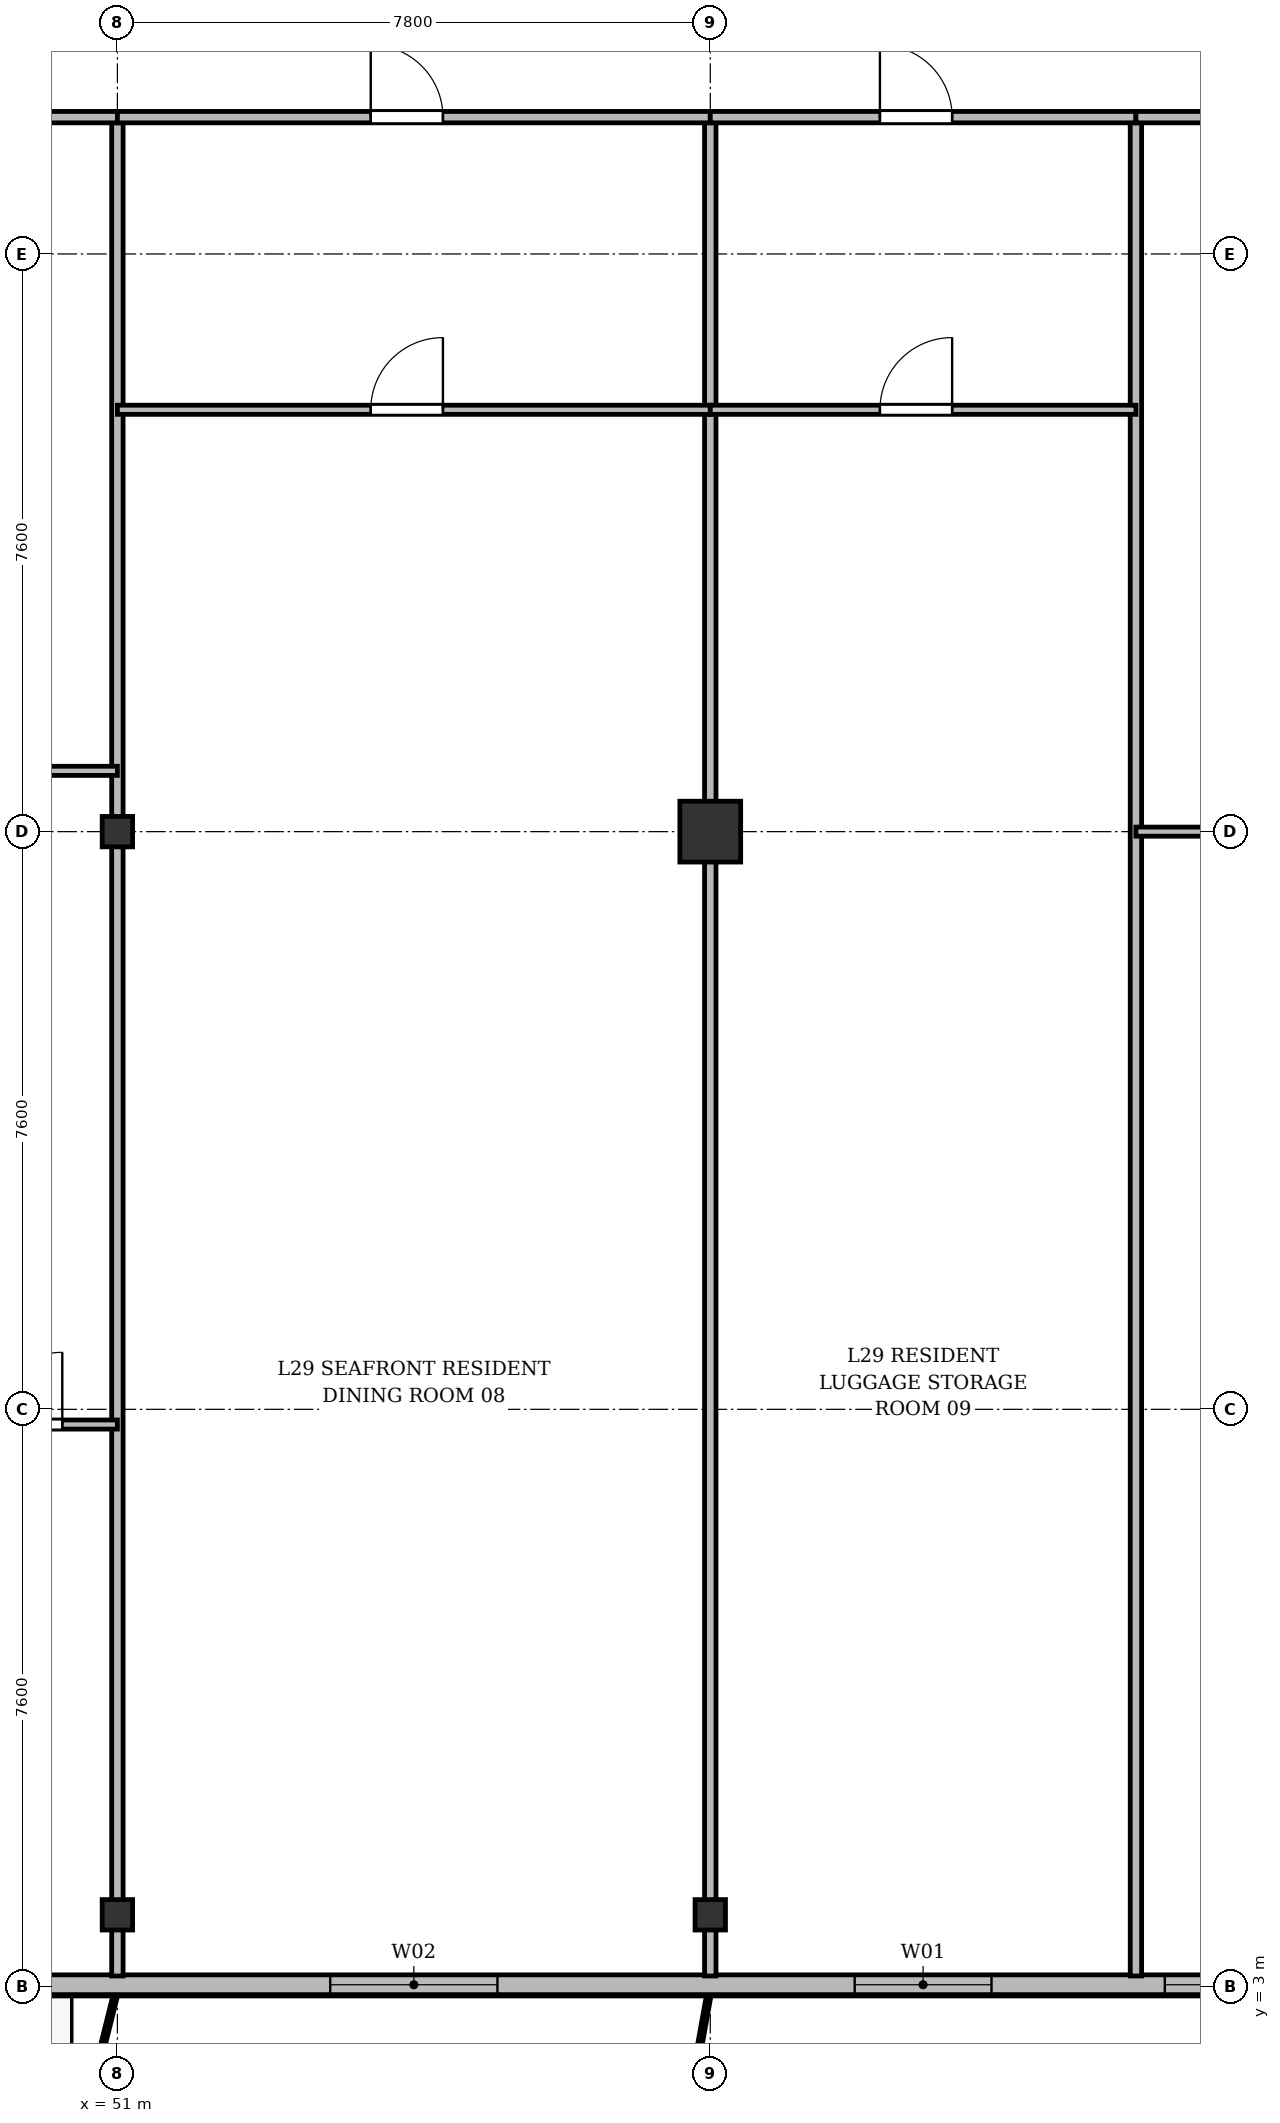
"""IFC4 building model, lengths in metres.
Left out: names, types, materials, properties, quantities, classifications, styles, units other than length and angle.
Written with IfcOpenShell. Run it as: python <this file> out.ifc"""

import sys

from ifc_helpers import new_model, si_unit, direction, frame, frame_2d, origin, origin_2d, place, context, subcontext, project, spatial, rectangle, i_section, extrude, source, transform, mapped, element, fill, save


model = new_model("IFC4")
c1 = context("Model", 3, precision=1e-05, world=origin(), true_north=direction((0.0, 1.0)))
c2 = subcontext(c1, "Body", "Model", "MODEL_VIEW")
j1 = project(units=[si_unit("LENGTHUNIT", "METRE"), si_unit("PLANEANGLEUNIT", "RADIAN")], contexts=[c1])
p1 = place(None, origin())
s1 = spatial("IfcSite", under=j1, at=p1, CompositionType="ELEMENT")
p2 = place(p1, origin())
s2 = spatial("IfcBuilding", under=s1, at=p2, CompositionType="ELEMENT")
p3 = place(p2, frame((0.0, 0.0, 114.1)))
s3 = spatial("IfcBuildingStorey", under=s2, at=p3, CompositionType="ELEMENT", Elevation=114.1)
m1 = source(origin(), c2, "Body", "SweptSolid", [
    extrude(i_section(OverallWidth=0.4, OverallDepth=0.4, WebThickness=0.022, FlangeThickness=0.035, at=origin_2d()), origin(), (0.0, 0.0, 1.0), 3.6),
])
for number, where, z_axis, x_axis in (
    (1, (51.0, 3.95, 0.0), (0.0, 0.0, 1.0), (1.0, 0.0, 0.0)),
    (2, (51.0, 18.2, 0.0), (0.0, 0.0, 1.0), (1.0, 0.0, 0.0)),
    (3, (58.8, 3.95, 0.0), (0.0, 0.0, 1.0), (1.0, 0.0, 0.0)),
):
    element("IfcColumn", number, at=place(p3, frame(where, z_axis=z_axis, x_axis=x_axis)), inside=s3, PredefinedType="COLUMN", context=c2, shape_type="MappedRepresentation", body=[
        mapped(m1, transform((0.0, 0.0, 0.0), x_axis=(1.0, 0.0, 0.0), y_axis=(0.0, 1.0, 0.0), z_axis=(0.0, 0.0, 1.0), scale=1.0)),
    ])
m2 = source(origin(), c2, "Body", "SweptSolid", [
    extrude(rectangle(XDim=0.8, YDim=0.8, at=origin_2d()), origin(), (0.0, 0.0, 1.0), 3.6),
])
p4 = place(p3, frame((58.8, 18.2, 0.0), z_axis=(0.0, 0.0, 1.0), x_axis=(1.0, 0.0, 0.0)))
e4 = element("IfcColumn", 4, at=p4, inside=s3, PredefinedType="COLUMN", context=c2, shape_type="MappedRepresentation", body=[
    mapped(m2, transform((0.0, 0.0, 0.0), x_axis=(1.0, 0.0, 0.0), y_axis=(0.0, 1.0, 0.0), z_axis=(0.0, 0.0, 1.0), scale=1.0)),
])
p5 = place(p3, frame((66.9, 3.03, 0.0), z_axis=(0.0, 0.0, 1.0), x_axis=(-1.0, 0.0, 0.0)))
e5 = element("IfcWall", 5, at=p5, inside=s3, PredefinedType="SOLIDWALL", context=c2, shape_type="SweptSolid", body=[
    extrude(rectangle(XDim=59.4, YDim=0.26, at=frame_2d((29.7, 0.0))), origin(), (0.0, 0.0, 1.0), 3.34),
])
p6 = place(p5, frame((0.47, 0.0, 0.9)))
e6 = element("IfcOpeningElement", 6, at=p6, cuts=e5, PredefinedType="OPENING", context=c2, shape_type="SweptSolid", body=[
    extrude(rectangle(XDim=1.65, YDim=1.85, at=frame_2d((0.825, 0.925))), frame((0.0, 0.14, 0.0), z_axis=(0.0, -1.0, 0.0), x_axis=(1.0, 0.0, 0.0)), (0.0, 0.0, 1.0), 0.28),
])
p7 = place(p5, frame((4.4, 0.0, 0.9)))
e7 = element("IfcOpeningElement", 7, at=p7, cuts=e5, PredefinedType="OPENING", context=c2, shape_type="SweptSolid", body=[
    extrude(rectangle(XDim=1.8, YDim=1.8, at=frame_2d((0.9, 0.9))), frame((0.0, 0.14, 0.0), z_axis=(0.0, -1.0, 0.0), x_axis=(1.0, 0.0, 0.0)), (0.0, 0.0, 1.0), 0.28),
])
p8 = place(p5, frame((10.9, 0.0, 0.9)))
e8 = element("IfcOpeningElement", 8, at=p8, cuts=e5, PredefinedType="OPENING", context=c2, shape_type="SweptSolid", body=[
    extrude(rectangle(XDim=2.2, YDim=1.8, at=frame_2d((1.1, 0.9))), frame((0.0, 0.14, 0.0), z_axis=(0.0, -1.0, 0.0), x_axis=(1.0, 0.0, 0.0)), (0.0, 0.0, 1.0), 0.28),
])
p9 = place(p5, frame((16.92, 0.0, 0.0)))
e9 = element("IfcOpeningElement", 9, at=p9, cuts=e5, PredefinedType="OPENING", context=c2, shape_type="SweptSolid", body=[
    extrude(rectangle(XDim=1.2, YDim=2.2, at=frame_2d((0.6, 1.1))), frame((0.0, 0.14, 0.0), z_axis=(0.0, -1.0, 0.0), x_axis=(1.0, 0.0, 0.0)), (0.0, 0.0, 1.0), 0.28),
])
p10 = place(p5, frame((18.75, 0.0, 0.9)))
e10 = element("IfcOpeningElement", 10, at=p10, cuts=e5, PredefinedType="OPENING", context=c2, shape_type="SweptSolid", body=[
    extrude(rectangle(XDim=1.5, YDim=1.75, at=frame_2d((0.75, 0.875))), frame((0.0, 0.14, 0.0), z_axis=(0.0, -1.0, 0.0), x_axis=(1.0, 0.0, 0.0)), (0.0, 0.0, 1.0), 0.28),
])
p11 = place(p5, frame((21.075, 0.0, 0.9)))
e11 = element("IfcOpeningElement", 11, at=p11, cuts=e5, PredefinedType="OPENING", context=c2, shape_type="SweptSolid", body=[
    extrude(rectangle(XDim=1.65, YDim=1.85, at=frame_2d((0.825, 0.925))), frame((0.0, 0.14, 0.0), z_axis=(0.0, -1.0, 0.0), x_axis=(1.0, 0.0, 0.0)), (0.0, 0.0, 1.0), 0.28),
])
p12 = place(p5, frame((26.5, 0.0, 0.9)))
e12 = element("IfcOpeningElement", 12, at=p12, cuts=e5, PredefinedType="OPENING", context=c2, shape_type="SweptSolid", body=[
    extrude(rectangle(XDim=1.8, YDim=1.8, at=frame_2d((0.9, 0.9))), frame((0.0, 0.14, 0.0), z_axis=(0.0, -1.0, 0.0), x_axis=(1.0, 0.0, 0.0)), (0.0, 0.0, 1.0), 0.28),
])
p13 = place(p5, frame((32.45, 0.0, 0.9)))
e13 = element("IfcOpeningElement", 13, at=p13, cuts=e5, PredefinedType="OPENING", context=c2, shape_type="SweptSolid", body=[
    extrude(rectangle(XDim=2.2, YDim=1.8, at=frame_2d((1.1, 0.9))), frame((0.0, 0.14, 0.0), z_axis=(0.0, -1.0, 0.0), x_axis=(1.0, 0.0, 0.0)), (0.0, 0.0, 1.0), 0.28),
])
p14 = place(p5, frame((36.5, 0.0, 0.9)))
e14 = element("IfcOpeningElement", 14, at=p14, cuts=e5, PredefinedType="OPENING", context=c2, shape_type="SweptSolid", body=[
    extrude(rectangle(XDim=1.5, YDim=1.75, at=frame_2d((0.75, 0.875))), frame((0.0, 0.14, 0.0), z_axis=(0.0, -1.0, 0.0), x_axis=(1.0, 0.0, 0.0)), (0.0, 0.0, 1.0), 0.28),
])
p15 = place(p5, frame((39.6, 0.0, 0.9)))
e15 = element("IfcOpeningElement", 15, at=p15, cuts=e5, PredefinedType="OPENING", context=c2, shape_type="SweptSolid", body=[
    extrude(rectangle(XDim=2.0, YDim=1.95, at=frame_2d((1.0, 0.975))), frame((0.0, 0.14, 0.0), z_axis=(0.0, -1.0, 0.0), x_axis=(1.0, 0.0, 0.0)), (0.0, 0.0, 1.0), 0.28),
])
p16 = place(p5, frame((42.775, 0.0, 0.9)))
e16 = element("IfcOpeningElement", 16, at=p16, cuts=e5, PredefinedType="OPENING", context=c2, shape_type="SweptSolid", body=[
    extrude(rectangle(XDim=1.65, YDim=1.85, at=frame_2d((0.825, 0.925))), frame((0.0, 0.14, 0.0), z_axis=(0.0, -1.0, 0.0), x_axis=(1.0, 0.0, 0.0)), (0.0, 0.0, 1.0), 0.28),
])
p17 = place(p5, frame((46.435, 0.0, 0.0)))
e17 = element("IfcOpeningElement", 17, at=p17, cuts=e5, PredefinedType="OPENING", context=c2, shape_type="SweptSolid", body=[
    extrude(rectangle(XDim=1.2, YDim=2.2, at=frame_2d((0.6, 1.1))), frame((0.0, 0.14, 0.0), z_axis=(0.0, -1.0, 0.0), x_axis=(1.0, 0.0, 0.0)), (0.0, 0.0, 1.0), 0.28),
])
p18 = place(p5, frame((48.65, 0.0, 0.9)))
e18 = element("IfcOpeningElement", 18, at=p18, cuts=e5, PredefinedType="OPENING", context=c2, shape_type="SweptSolid", body=[
    extrude(rectangle(XDim=2.2, YDim=1.8, at=frame_2d((1.1, 0.9))), frame((0.0, 0.14, 0.0), z_axis=(0.0, -1.0, 0.0), x_axis=(1.0, 0.0, 0.0)), (0.0, 0.0, 1.0), 0.28),
])
p19 = place(p5, frame((53.25, 0.0, 0.9)))
e19 = element("IfcOpeningElement", 19, at=p19, cuts=e5, PredefinedType="OPENING", context=c2, shape_type="SweptSolid", body=[
    extrude(rectangle(XDim=1.5, YDim=1.75, at=frame_2d((0.75, 0.875))), frame((0.0, 0.14, 0.0), z_axis=(0.0, -1.0, 0.0), x_axis=(1.0, 0.0, 0.0)), (0.0, 0.0, 1.0), 0.28),
])
p20 = place(p5, frame((57.005, 0.0, 0.9)))
e20 = element("IfcOpeningElement", 20, at=p20, cuts=e5, PredefinedType="OPENING", context=c2, shape_type="SweptSolid", body=[
    extrude(rectangle(XDim=2.0, YDim=1.95, at=frame_2d((1.0, 0.975))), frame((0.0, 0.14, 0.0), z_axis=(0.0, -1.0, 0.0), x_axis=(1.0, 0.0, 0.0)), (0.0, 0.0, 1.0), 0.28),
])
for number, where, z_axis, x_axis in (
    (21, (51.0, 3.145, 0.0), (0.0, 0.0, 1.0), (0.0, 1.0, 0.0)),
    (22, (58.8, 3.145, 0.0), (0.0, 0.0, 1.0), (0.0, 1.0, 0.0)),
):
    element("IfcWall", number, at=place(p3, frame(where, z_axis=z_axis, x_axis=x_axis)), inside=s3, PredefinedType="PARTITIONING", context=c2, shape_type="SweptSolid", body=[
        extrude(rectangle(XDim=24.455, YDim=0.15, at=frame_2d((12.228, 0.0))), origin(), (0.0, 0.0, 1.0), 2.84),
    ])
p21 = place(p3, frame((64.4, 3.145, 0.0), z_axis=(0.0, 0.0, 1.0), x_axis=(0.0, 1.0, 0.0)))
e23 = element("IfcWall", 23, at=p21, inside=s3, PredefinedType="PARTITIONING", context=c2, shape_type="SweptSolid", body=[
    extrude(rectangle(XDim=24.455, YDim=0.15, at=frame_2d((12.228, 0.0))), origin(), (0.0, 0.0, 1.0), 2.752),
])
p22 = place(p3, frame((43.8, 19.0, 0.0), z_axis=(0.0, 0.0, 1.0), x_axis=(1.0, 0.0, 0.0)))
e24 = element("IfcWall", 24, at=p22, inside=s3, PredefinedType="PARTITIONING", context=c2, shape_type="SweptSolid", body=[
    extrude(rectangle(XDim=7.2, YDim=0.12, at=frame_2d((3.6, 0.0))), origin(), (0.0, 0.0, 1.0), 2.84),
])
p23 = place(p22, frame((3.125, 0.0, 0.0)))
e25 = element("IfcOpeningElement", 25, at=p23, cuts=e24, PredefinedType="OPENING", context=c2, shape_type="SweptSolid", body=[
    extrude(rectangle(XDim=0.95, YDim=2.15, at=frame_2d((0.475, 1.075))), frame((0.0, 0.07, 0.0), z_axis=(0.0, -1.0, 0.0), x_axis=(1.0, 0.0, 0.0)), (0.0, 0.0, 1.0), 0.14),
])
p24 = place(p3, frame((43.8, 27.6, 0.0), z_axis=(0.0, 0.0, 1.0), x_axis=(1.0, 0.0, 0.0)))
e26 = element("IfcWall", 26, at=p24, inside=s3, PredefinedType="PARTITIONING", context=c2, shape_type="SweptSolid", body=[
    extrude(rectangle(XDim=7.2, YDim=0.15, at=frame_2d((3.6, 0.0))), origin(), (0.0, 0.0, 1.0), 2.84),
])
p25 = place(p24, frame((4.706, 0.0, 0.0)))
e27 = element("IfcOpeningElement", 27, at=p25, cuts=e26, PredefinedType="OPENING", context=c2, shape_type="SweptSolid", body=[
    extrude(rectangle(XDim=0.95, YDim=2.15, at=frame_2d((0.475, 1.075))), frame((0.0, 0.085, 0.0), z_axis=(0.0, -1.0, 0.0), x_axis=(1.0, 0.0, 0.0)), (0.0, 0.0, 1.0), 0.17),
])
p26 = place(p3, frame((48.6, 10.4, 0.0), z_axis=(0.0, 0.0, 1.0), x_axis=(1.0, 0.0, 0.0)))
e28 = element("IfcWall", 28, at=p26, inside=s3, PredefinedType="PARTITIONING", context=c2, shape_type="SweptSolid", body=[
    extrude(rectangle(XDim=2.4, YDim=0.12, at=frame_2d((1.2, 0.0))), origin(), (0.0, 0.0, 1.0), 2.84),
])
p27 = place(p26, frame((0.725, 0.0, 0.0)))
e29 = element("IfcOpeningElement", 29, at=p27, cuts=e28, PredefinedType="OPENING", context=c2, shape_type="SweptSolid", body=[
    extrude(rectangle(XDim=0.95, YDim=2.15, at=frame_2d((0.475, 1.075))), frame((0.0, 0.07, 0.0), z_axis=(0.0, -1.0, 0.0), x_axis=(1.0, 0.0, 0.0)), (0.0, 0.0, 1.0), 0.14),
])
p28 = place(p3, frame((51.0, 27.6, 0.0), z_axis=(0.0, 0.0, 1.0), x_axis=(1.0, 0.0, 0.0)))
e30 = element("IfcWall", 30, at=p28, inside=s3, PredefinedType="PARTITIONING", context=c2, shape_type="SweptSolid", body=[
    extrude(rectangle(XDim=7.8, YDim=0.15, at=frame_2d((3.9, 0.0))), origin(), (0.0, 0.0, 1.0), 2.84),
])
p29 = place(p28, frame((3.333, 0.0, 0.0)))
e31 = element("IfcOpeningElement", 31, at=p29, cuts=e30, PredefinedType="OPENING", context=c2, shape_type="SweptSolid", body=[
    extrude(rectangle(XDim=0.95, YDim=2.15, at=frame_2d((0.475, 1.075))), frame((0.0, 0.085, 0.0), z_axis=(0.0, -1.0, 0.0), x_axis=(1.0, 0.0, 0.0)), (0.0, 0.0, 1.0), 0.17),
])
p30 = place(p3, frame((51.0, 23.75, 0.0), z_axis=(0.0, 0.0, 1.0), x_axis=(1.0, 0.0, 0.0)))
e32 = element("IfcWall", 32, at=p30, inside=s3, PredefinedType="PARTITIONING", context=c2, shape_type="SweptSolid", body=[
    extrude(rectangle(XDim=7.8, YDim=0.12, at=frame_2d((3.9, 0.0))), origin(), (0.0, 0.0, 1.0), 2.84),
])
p31 = place(p30, frame((3.333, 0.0, 0.0)))
e33 = element("IfcOpeningElement", 33, at=p31, cuts=e32, PredefinedType="OPENING", context=c2, shape_type="SweptSolid", body=[
    extrude(rectangle(XDim=0.95, YDim=2.15, at=frame_2d((0.475, 1.075))), frame((0.0, 0.07, 0.0), z_axis=(0.0, -1.0, 0.0), x_axis=(1.0, 0.0, 0.0)), (0.0, 0.0, 1.0), 0.14),
])
p32 = place(p3, frame((58.8, 27.6, 0.0), z_axis=(0.0, 0.0, 1.0), x_axis=(1.0, 0.0, 0.0)))
e34 = element("IfcWall", 34, at=p32, inside=s3, PredefinedType="PARTITIONING", context=c2, shape_type="SweptSolid", body=[
    extrude(rectangle(XDim=5.6, YDim=0.15, at=frame_2d((2.8, 0.0))), origin(), (0.0, 0.0, 1.0), 2.84),
])
p33 = place(p32, frame((2.232, 0.0, 0.0)))
e35 = element("IfcOpeningElement", 35, at=p33, cuts=e34, PredefinedType="OPENING", context=c2, shape_type="SweptSolid", body=[
    extrude(rectangle(XDim=0.95, YDim=2.15, at=frame_2d((0.475, 1.075))), frame((0.0, 0.085, 0.0), z_axis=(0.0, -1.0, 0.0), x_axis=(1.0, 0.0, 0.0)), (0.0, 0.0, 1.0), 0.17),
])
p34 = place(p3, frame((58.8, 23.75, 0.0), z_axis=(0.0, 0.0, 1.0), x_axis=(1.0, 0.0, 0.0)))
e36 = element("IfcWall", 36, at=p34, inside=s3, PredefinedType="PARTITIONING", context=c2, shape_type="SweptSolid", body=[
    extrude(rectangle(XDim=5.6, YDim=0.12, at=frame_2d((2.8, 0.0))), origin(), (0.0, 0.0, 1.0), 2.84),
])
p35 = place(p34, frame((2.232, 0.0, 0.0)))
e37 = element("IfcOpeningElement", 37, at=p35, cuts=e36, PredefinedType="OPENING", context=c2, shape_type="SweptSolid", body=[
    extrude(rectangle(XDim=0.95, YDim=2.15, at=frame_2d((0.475, 1.075))), frame((0.0, 0.07, 0.0), z_axis=(0.0, -1.0, 0.0), x_axis=(1.0, 0.0, 0.0)), (0.0, 0.0, 1.0), 0.14),
])
p36 = place(p3, frame((64.4, 27.6, 0.0), z_axis=(0.0, 0.0, 1.0), x_axis=(1.0, 0.0, 0.0)))
e38 = element("IfcWall", 38, at=p36, inside=s3, PredefinedType="PARTITIONING", context=c2, shape_type="SweptSolid", body=[
    extrude(rectangle(XDim=5.255, YDim=0.15, at=frame_2d((2.627, 0.0))), origin(), (0.0, 0.0, 1.0), 2.84),
])
p37 = place(p36, frame((2.059, 0.0, 0.0)))
e39 = element("IfcOpeningElement", 39, at=p37, cuts=e38, PredefinedType="OPENING", context=c2, shape_type="SweptSolid", body=[
    extrude(rectangle(XDim=0.95, YDim=2.15, at=frame_2d((0.475, 1.075))), frame((0.0, 0.085, 0.0), z_axis=(0.0, -1.0, 0.0), x_axis=(1.0, 0.0, 0.0)), (0.0, 0.0, 1.0), 0.17),
])
p38 = place(p3, frame((64.4, 18.2, 0.0), z_axis=(0.0, 0.0, 1.0), x_axis=(1.0, 0.0, 0.0)))
e40 = element("IfcWall", 40, at=p38, inside=s3, PredefinedType="PARTITIONING", context=c2, shape_type="SweptSolid", body=[
    extrude(rectangle(XDim=5.255, YDim=0.12, at=frame_2d((2.627, 0.0))), origin(), (0.0, 0.0, 1.0), 2.752),
])
p39 = place(p38, frame((2.246, 0.0, 0.0)))
e41 = element("IfcOpeningElement", 41, at=p39, cuts=e40, PredefinedType="OPENING", context=c2, shape_type="SweptSolid", body=[
    extrude(rectangle(XDim=0.95, YDim=2.15, at=frame_2d((0.475, 1.075))), frame((0.0, 0.07, 0.0), z_axis=(0.0, -1.0, 0.0), x_axis=(1.0, 0.0, 0.0)), (0.0, 0.0, 1.0), 0.14),
])
m3 = source(origin(), c2, "Body", "SweptSolid", [
    extrude(rectangle(XDim=1.65, YDim=1.85, at=frame_2d((0.825, 0.925))), frame((0.0, 0.03, 0.0), z_axis=(0.0, -1.0, 0.0), x_axis=(1.0, 0.0, 0.0)), (0.0, 0.0, 1.0), 0.06),
])
p40 = place(p6, origin())
e42 = element("IfcWindow", 42, at=p40, inside=s3, PartitioningType="SINGLE_PANEL", PredefinedType="WINDOW", context=c2, shape_type="MappedRepresentation", body=[
    mapped(m3, transform((0.0, 0.0, 0.0), x_axis=(1.0, 0.0, 0.0), y_axis=(0.0, 1.0, 0.0), z_axis=(0.0, 0.0, 1.0), scale=1.0)),
])
fill(e6, e42)
m4 = source(origin(), c2, "Body", "SweptSolid", [
    extrude(rectangle(XDim=1.8, YDim=1.8, at=frame_2d((0.9, 0.9))), frame((0.0, 0.03, 0.0), z_axis=(0.0, -1.0, 0.0), x_axis=(1.0, 0.0, 0.0)), (0.0, 0.0, 1.0), 0.06),
])
p41 = place(p7, origin())
e43 = element("IfcWindow", 43, at=p41, inside=s3, PartitioningType="SINGLE_PANEL", PredefinedType="WINDOW", context=c2, shape_type="MappedRepresentation", body=[
    mapped(m4, transform((0.0, 0.0, 0.0), x_axis=(1.0, 0.0, 0.0), y_axis=(0.0, 1.0, 0.0), z_axis=(0.0, 0.0, 1.0), scale=1.0)),
])
fill(e7, e43)
m5 = source(origin(), c2, "Body", "SweptSolid", [
    extrude(rectangle(XDim=2.2, YDim=1.8, at=frame_2d((1.1, 0.9))), frame((0.0, 0.03, 0.0), z_axis=(0.0, -1.0, 0.0), x_axis=(1.0, 0.0, 0.0)), (0.0, 0.0, 1.0), 0.06),
])
p42 = place(p8, origin())
e44 = element("IfcWindow", 44, at=p42, inside=s3, PartitioningType="SINGLE_PANEL", PredefinedType="WINDOW", context=c2, shape_type="MappedRepresentation", body=[
    mapped(m5, transform((0.0, 0.0, 0.0), x_axis=(1.0, 0.0, 0.0), y_axis=(0.0, 1.0, 0.0), z_axis=(0.0, 0.0, 1.0), scale=1.0)),
])
fill(e8, e44)
m6 = source(origin(), c2, "Body", "SweptSolid", [
    extrude(rectangle(XDim=0.95, YDim=2.15, at=frame_2d((0.475, 1.075))), frame((0.0, 0.025, 0.0), z_axis=(0.0, -1.0, 0.0), x_axis=(1.0, 0.0, 0.0)), (0.0, 0.0, 1.0), 0.05),
])
p43 = place(p27, origin())
e45 = element("IfcDoor", 45, at=p43, inside=s3, OperationType="SINGLE_SWING_RIGHT", PredefinedType="DOOR", context=c2, shape_type="MappedRepresentation", body=[
    mapped(m6, transform((0.0, 0.0, 0.0), x_axis=(1.0, 0.0, 0.0), y_axis=(0.0, 1.0, 0.0), z_axis=(0.0, 0.0, 1.0), scale=1.0)),
])
fill(e29, e45)
p44 = place(p29, origin())
e46 = element("IfcDoor", 46, at=p44, inside=s3, OperationType="SINGLE_SWING_LEFT", PredefinedType="DOOR", context=c2, shape_type="MappedRepresentation", body=[
    mapped(m6, transform((0.0, 0.0, 0.0), x_axis=(1.0, 0.0, 0.0), y_axis=(0.0, 1.0, 0.0), z_axis=(0.0, 0.0, 1.0), scale=1.0)),
])
fill(e31, e46)
p45 = place(p31, origin())
e47 = element("IfcDoor", 47, at=p45, inside=s3, OperationType="SINGLE_SWING_RIGHT", PredefinedType="DOOR", context=c2, shape_type="MappedRepresentation", body=[
    mapped(m6, transform((0.0, 0.0, 0.0), x_axis=(1.0, 0.0, 0.0), y_axis=(0.0, 1.0, 0.0), z_axis=(0.0, 0.0, 1.0), scale=1.0)),
])
fill(e33, e47)
p46 = place(p33, origin())
e48 = element("IfcDoor", 48, at=p46, inside=s3, OperationType="SINGLE_SWING_LEFT", PredefinedType="DOOR", context=c2, shape_type="MappedRepresentation", body=[
    mapped(m6, transform((0.0, 0.0, 0.0), x_axis=(1.0, 0.0, 0.0), y_axis=(0.0, 1.0, 0.0), z_axis=(0.0, 0.0, 1.0), scale=1.0)),
])
fill(e35, e48)
p47 = place(p35, origin())
e49 = element("IfcDoor", 49, at=p47, inside=s3, OperationType="SINGLE_SWING_RIGHT", PredefinedType="DOOR", context=c2, shape_type="MappedRepresentation", body=[
    mapped(m6, transform((0.0, 0.0, 0.0), x_axis=(1.0, 0.0, 0.0), y_axis=(0.0, 1.0, 0.0), z_axis=(0.0, 0.0, 1.0), scale=1.0)),
])
fill(e37, e49)
save(model, sys.argv[1])
